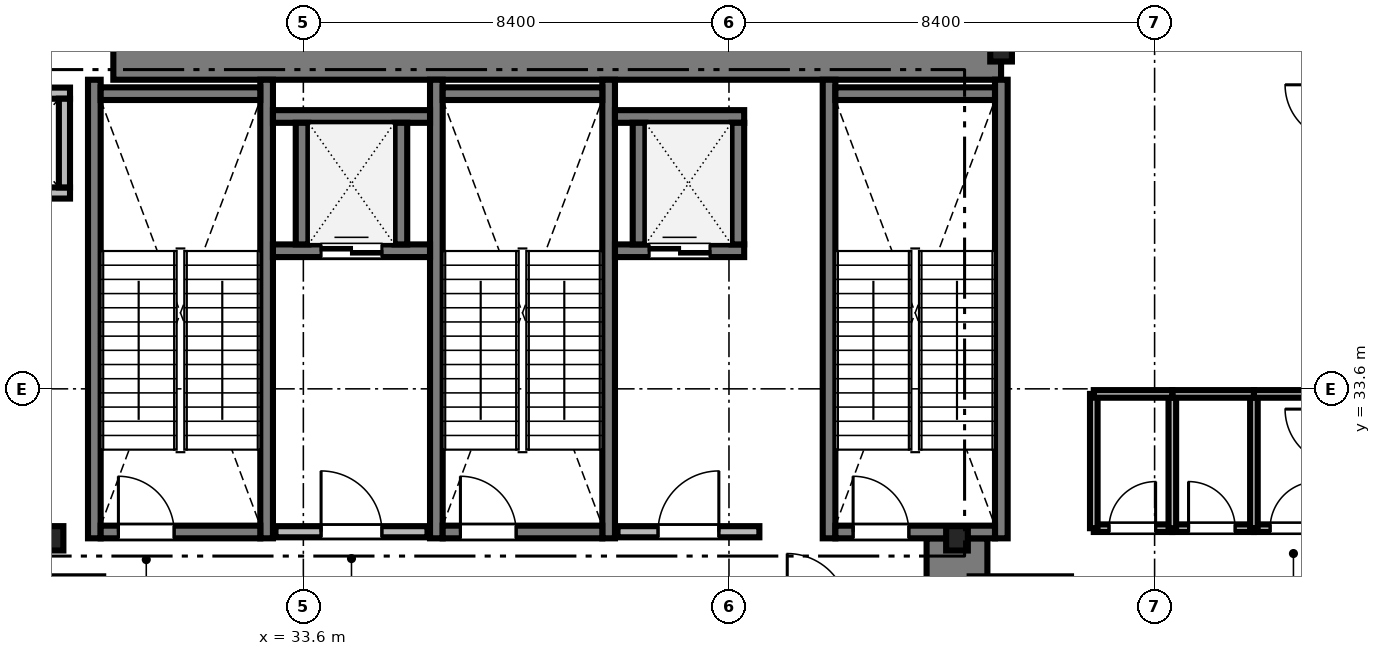
"""IFC4 building model, lengths in metres.
Left out: names, types, materials, properties, quantities, classifications, styles, units other than length and angle.
Written with IfcOpenShell. Run it as: python <this file> out.ifc"""

import sys

from ifc_helpers import new_model, si_unit, direction, frame, frame_2d, origin, origin_2d, place, context, subcontext, project, spatial, rectangle, i_section, extrude, source, transform, mapped, element, fill, save


model = new_model("IFC4")
c1 = context("Model", 3, precision=1e-05, world=origin(), true_north=direction((0.0, 1.0)))
c2 = subcontext(c1, "Body", "Model", "MODEL_VIEW")
j1 = project(units=[si_unit("LENGTHUNIT", "METRE"), si_unit("PLANEANGLEUNIT", "RADIAN")], contexts=[c1])
p1 = place(None, origin())
s1 = spatial("IfcSite", under=j1, at=p1, CompositionType="ELEMENT")
p2 = place(p1, origin())
s2 = spatial("IfcBuilding", under=s1, at=p2, CompositionType="ELEMENT")
p3 = place(p2, frame((0.0, 0.0, 6.0)))
s3 = spatial("IfcBuildingStorey", under=s2, at=p3, CompositionType="ELEMENT", Elevation=6.0)
m1 = source(origin(), c2, "Body", "SweptSolid", [
    extrude(rectangle(XDim=17.52, YDim=1.2, at=frame_2d((8.76, 0.0))), origin(), (0.0, 0.0, 1.0), 5.0),
])
p4 = place(p3, frame((29.85, 40.3, 0.0), z_axis=(0.0, 0.0, 1.0), x_axis=(1.0, 0.0, 0.0)))
e1 = element("IfcWall", 1, at=p4, inside=s3, PredefinedType="SHEAR", context=c2, shape_type="MappedRepresentation", body=[
    mapped(m1, transform((0.0, 0.0, 0.0), scale=1.0)),
])
m2 = source(origin(), c2, "Body", "SweptSolid", [
    extrude(rectangle(XDim=13.15, YDim=1.2, at=frame_2d((6.575, 0.0))), origin(), (0.0, 0.0, 1.0), 5.0),
])
p5 = place(p3, frame((46.5, 17.5, 0.0), z_axis=(0.0, 0.0, 1.0), x_axis=(0.0, 1.0, 0.0)))
e2 = element("IfcWall", 2, at=p5, inside=s3, PredefinedType="SHEAR", context=c2, shape_type="MappedRepresentation", body=[
    mapped(m2, transform((0.0, 0.0, 0.0), scale=1.0)),
])
m3 = source(origin(), c2, "Body", "SweptSolid", [
    extrude(i_section(OverallWidth=0.428, OverallDepth=0.481, WebThickness=0.04, FlangeThickness=0.063, FilletRadius=0.015, at=origin_2d()), origin(), (0.0, 0.0, 1.0), 5.0),
])
for number, where, z_axis, x_axis in (
    (3, (28.65, 30.65, 0.0), (0.0, 0.0, 1.0), (1.0, 0.0, 0.0)),
    (4, (46.5, 30.65, 0.0), (0.0, 0.0, 1.0), (1.0, 0.0, 0.0)),
    (5, (47.37, 40.3, 0.0), (0.0, 0.0, 1.0), (1.0, 0.0, 0.0)),
):
    element("IfcColumn", number, at=place(p3, frame(where, z_axis=z_axis, x_axis=x_axis)), inside=s3, PredefinedType="COLUMN", context=c2, shape_type="MappedRepresentation", body=[
        mapped(m3, transform((0.0, 0.0, 0.0), scale=1.0)),
    ])
m4 = source(origin(), c2, "Body", "SweptSolid", [
    extrude(rectangle(XDim=9.05, YDim=0.25, at=frame_2d((4.525, 0.0))), origin(), (0.0, 0.0, 1.0), 5.2),
])
for number, where, z_axis, x_axis in (
    (6, (29.475, 30.65, 0.0), (0.0, 0.0, 1.0), (0.0, 1.0, 0.0)),
    (7, (32.875, 30.65, 0.0), (0.0, 0.0, 1.0), (0.0, 1.0, 0.0)),
):
    element("IfcWall", number, at=place(p3, frame(where, z_axis=z_axis, x_axis=x_axis)), inside=s3, PredefinedType="SOLIDWALL", context=c2, shape_type="MappedRepresentation", body=[
        mapped(m4, transform((0.0, 0.0, 0.0), scale=1.0)),
    ])
m5 = source(origin(), c2, "Body", "SweptSolid", [
    extrude(rectangle(XDim=3.15, YDim=0.25, at=frame_2d((1.575, 0.0))), origin(), (0.0, 0.0, 1.0), 5.2),
])
p6 = place(p3, frame((29.6, 39.425, 0.0), z_axis=(0.0, 0.0, 1.0), x_axis=(1.0, 0.0, 0.0)))
e8 = element("IfcWall", 8, at=p6, inside=s3, PredefinedType="SOLIDWALL", context=c2, shape_type="MappedRepresentation", body=[
    mapped(m5, transform((0.0, 0.0, 0.0), scale=1.0)),
])
p7 = place(p3, frame((29.6, 30.775, 0.0), z_axis=(0.0, 0.0, 1.0), x_axis=(1.0, 0.0, 0.0)))
e9 = element("IfcWall", 9, at=p7, inside=s3, PredefinedType="SOLIDWALL", context=c2, shape_type="MappedRepresentation", body=[
    mapped(m5, transform((0.0, 0.0, 0.0), scale=1.0)),
])
m6 = source(origin(), c2, "Body", "SweptSolid", [
    extrude(rectangle(XDim=1.1, YDim=2.2, at=frame_2d((0.55, 1.1))), frame((0.0, 0.135, 0.0), z_axis=(0.0, -1.0, 0.0), x_axis=(1.0, 0.0, 0.0)), (0.0, 0.0, 1.0), 0.27),
])
p8 = place(p7, frame((0.35, 0.0, 0.0)))
e10 = element("IfcOpeningElement", 10, at=p8, cuts=e9, PredefinedType="OPENING", context=c2, shape_type="MappedRepresentation", body=[
    mapped(m6, transform((0.0, 0.0, 0.0), scale=1.0)),
])
for number, where, z_axis, x_axis in (
    (11, (36.225, 30.65, 0.0), (0.0, 0.0, 1.0), (0.0, 1.0, 0.0)),
    (12, (39.625, 30.65, 0.0), (0.0, 0.0, 1.0), (0.0, 1.0, 0.0)),
):
    element("IfcWall", number, at=place(p3, frame(where, z_axis=z_axis, x_axis=x_axis)), inside=s3, PredefinedType="SOLIDWALL", context=c2, shape_type="MappedRepresentation", body=[
        mapped(m4, transform((0.0, 0.0, 0.0), scale=1.0)),
    ])
p9 = place(p3, frame((36.35, 39.425, 0.0), z_axis=(0.0, 0.0, 1.0), x_axis=(1.0, 0.0, 0.0)))
e13 = element("IfcWall", 13, at=p9, inside=s3, PredefinedType="SOLIDWALL", context=c2, shape_type="MappedRepresentation", body=[
    mapped(m5, transform((0.0, 0.0, 0.0), scale=1.0)),
])
p10 = place(p3, frame((36.35, 30.775, 0.0), z_axis=(0.0, 0.0, 1.0), x_axis=(1.0, 0.0, 0.0)))
e14 = element("IfcWall", 14, at=p10, inside=s3, PredefinedType="SOLIDWALL", context=c2, shape_type="MappedRepresentation", body=[
    mapped(m5, transform((0.0, 0.0, 0.0), scale=1.0)),
])
p11 = place(p10, frame((0.35, 0.0, 0.0)))
e15 = element("IfcOpeningElement", 15, at=p11, cuts=e14, PredefinedType="OPENING", context=c2, shape_type="MappedRepresentation", body=[
    mapped(m6, transform((0.0, 0.0, 0.0), scale=1.0)),
])
for number, where, z_axis, x_axis in (
    (16, (43.975, 30.65, 0.0), (0.0, 0.0, 1.0), (0.0, 1.0, 0.0)),
    (17, (47.375, 30.65, 0.0), (0.0, 0.0, 1.0), (0.0, 1.0, 0.0)),
):
    element("IfcWall", number, at=place(p3, frame(where, z_axis=z_axis, x_axis=x_axis)), inside=s3, PredefinedType="SOLIDWALL", context=c2, shape_type="MappedRepresentation", body=[
        mapped(m4, transform((0.0, 0.0, 0.0), scale=1.0)),
    ])
p12 = place(p3, frame((44.1, 39.425, 0.0), z_axis=(0.0, 0.0, 1.0), x_axis=(1.0, 0.0, 0.0)))
e18 = element("IfcWall", 18, at=p12, inside=s3, PredefinedType="SOLIDWALL", context=c2, shape_type="MappedRepresentation", body=[
    mapped(m5, transform((0.0, 0.0, 0.0), scale=1.0)),
])
p13 = place(p3, frame((44.1, 30.775, 0.0), z_axis=(0.0, 0.0, 1.0), x_axis=(1.0, 0.0, 0.0)))
e19 = element("IfcWall", 19, at=p13, inside=s3, PredefinedType="SOLIDWALL", context=c2, shape_type="MappedRepresentation", body=[
    mapped(m5, transform((0.0, 0.0, 0.0), scale=1.0)),
])
p14 = place(p13, frame((0.35, 0.0, 0.0)))
e20 = element("IfcOpeningElement", 20, at=p14, cuts=e19, PredefinedType="OPENING", context=c2, shape_type="MappedRepresentation", body=[
    mapped(m6, transform((0.0, 0.0, 0.0), scale=1.0)),
])
m7 = source(origin(), c2, "Body", "SweptSolid", [
    extrude(rectangle(XDim=3.0, YDim=0.22, at=frame_2d((1.5, 0.0))), origin(), (0.0, 0.0, 1.0), 5.0),
])
p15 = place(p3, frame((33.05, 30.78, 0.0), z_axis=(0.0, 0.0, 1.0), x_axis=(1.0, 0.0, 0.0)))
e21 = element("IfcWall", 21, at=p15, inside=s3, PredefinedType="SOLIDWALL", context=c2, shape_type="MappedRepresentation", body=[
    mapped(m7, transform((0.0, 0.0, 0.0), scale=1.0)),
])
m8 = source(origin(), c2, "Body", "SweptSolid", [
    extrude(rectangle(XDim=1.2, YDim=2.2, at=frame_2d((0.6, 1.1))), frame((0.0, 0.12, 0.0), z_axis=(0.0, -1.0, 0.0), x_axis=(1.0, 0.0, 0.0)), (0.0, 0.0, 1.0), 0.24),
])
p16 = place(p15, frame((0.9, 0.0, 0.0)))
e22 = element("IfcOpeningElement", 22, at=p16, cuts=e21, PredefinedType="OPENING", context=c2, shape_type="MappedRepresentation", body=[
    mapped(m8, transform((0.0, 0.0, 0.0), scale=1.0)),
])
m9 = source(origin(), c2, "Body", "SweptSolid", [
    extrude(rectangle(XDim=2.8, YDim=0.22, at=frame_2d((1.4, 0.0))), origin(), (0.0, 0.0, 1.0), 5.0),
])
p17 = place(p3, frame((39.8, 30.78, 0.0), z_axis=(0.0, 0.0, 1.0), x_axis=(1.0, 0.0, 0.0)))
e23 = element("IfcWall", 23, at=p17, inside=s3, PredefinedType="SOLIDWALL", context=c2, shape_type="MappedRepresentation", body=[
    mapped(m9, transform((0.0, 0.0, 0.0), scale=1.0)),
])
p18 = place(p17, frame((0.8, 0.0, 0.0)))
e24 = element("IfcOpeningElement", 24, at=p18, cuts=e23, PredefinedType="OPENING", context=c2, shape_type="MappedRepresentation", body=[
    mapped(m8, transform((0.0, 0.0, 0.0), scale=1.0)),
])
m10 = source(origin(), c2, "Body", "SweptSolid", [
    extrude(rectangle(XDim=1.99, YDim=0.22, at=frame_2d((0.995, 0.0))), origin(), (0.0, 0.0, 1.0), 5.0),
])
for number, where, z_axis, x_axis in (
    (25, (27.005, 37.465, 0.0), (0.0, 0.0, 1.0), (1.0, 0.0, 0.0)),
    (26, (27.005, 39.435, 0.0), (0.0, 0.0, 1.0), (1.0, 0.0, 0.0)),
):
    element("IfcWall", number, at=place(p3, frame(where, z_axis=z_axis, x_axis=x_axis)), inside=s3, PredefinedType="SOLIDWALL", context=c2, shape_type="MappedRepresentation", body=[
        mapped(m10, transform((0.0, 0.0, 0.0), scale=1.0)),
    ])
m11 = source(origin(), c2, "Body", "SweptSolid", [
    extrude(rectangle(XDim=1.75, YDim=0.22, at=frame_2d((0.875, 0.0))), origin(), (0.0, 0.0, 1.0), 5.0),
])
p19 = place(p3, frame((28.885, 37.575, 0.0), z_axis=(0.0, 0.0, 1.0), x_axis=(0.0, 1.0, 0.0)))
e27 = element("IfcWall", 27, at=p19, inside=s3, PredefinedType="SOLIDWALL", context=c2, shape_type="MappedRepresentation", body=[
    mapped(m11, transform((0.0, 0.0, 0.0), scale=1.0)),
])
m12 = source(origin(), c2, "Body", "SweptSolid", [
    extrude(rectangle(XDim=3.1, YDim=0.25, at=frame_2d((1.55, 0.0))), origin(), (0.0, 0.0, 1.0), 5.0),
])
p20 = place(p3, frame((33.0, 36.325, 0.0), z_axis=(0.0, 0.0, 1.0), x_axis=(1.0, 0.0, 0.0)))
e28 = element("IfcWall", 28, at=p20, inside=s3, PredefinedType="SOLIDWALL", context=c2, shape_type="MappedRepresentation", body=[
    mapped(m12, transform((0.0, 0.0, 0.0), scale=1.0)),
])
m13 = source(origin(), c2, "Body", "SweptSolid", [
    extrude(rectangle(XDim=1.2, YDim=2.25, at=frame_2d((0.6, 1.125))), frame((0.0, 0.135, 0.0), z_axis=(0.0, -1.0, 0.0), x_axis=(1.0, 0.0, 0.0)), (0.0, 0.0, 1.0), 0.27),
])
p21 = place(p20, frame((0.95, 0.0, 0.0)))
e29 = element("IfcOpeningElement", 29, at=p21, cuts=e28, PredefinedType="OPENING", context=c2, shape_type="MappedRepresentation", body=[
    mapped(m13, transform((0.0, 0.0, 0.0), scale=1.0)),
])
p22 = place(p3, frame((33.0, 38.975, 0.0), z_axis=(0.0, 0.0, 1.0), x_axis=(1.0, 0.0, 0.0)))
e30 = element("IfcWall", 30, at=p22, inside=s3, PredefinedType="SOLIDWALL", context=c2, shape_type="MappedRepresentation", body=[
    mapped(m12, transform((0.0, 0.0, 0.0), scale=1.0)),
])
m14 = source(origin(), c2, "Body", "SweptSolid", [
    extrude(rectangle(XDim=2.4, YDim=0.25, at=frame_2d((1.2, 0.0))), origin(), (0.0, 0.0, 1.0), 5.0),
])
for number, where, z_axis, x_axis in (
    (31, (33.575, 36.45, 0.0), (0.0, 0.0, 1.0), (0.0, 1.0, 0.0)),
    (32, (35.525, 36.45, 0.0), (0.0, 0.0, 1.0), (0.0, 1.0, 0.0)),
):
    element("IfcWall", number, at=place(p3, frame(where, z_axis=z_axis, x_axis=x_axis)), inside=s3, PredefinedType="SOLIDWALL", context=c2, shape_type="MappedRepresentation", body=[
        mapped(m14, transform((0.0, 0.0, 0.0), scale=1.0)),
    ])
m15 = source(origin(), c2, "Body", "SweptSolid", [
    extrude(rectangle(XDim=2.55, YDim=0.25, at=frame_2d((1.275, 0.0))), origin(), (0.0, 0.0, 1.0), 5.0),
])
p23 = place(p3, frame((39.75, 36.325, 0.0), z_axis=(0.0, 0.0, 1.0), x_axis=(1.0, 0.0, 0.0)))
e33 = element("IfcWall", 33, at=p23, inside=s3, PredefinedType="SOLIDWALL", context=c2, shape_type="MappedRepresentation", body=[
    mapped(m15, transform((0.0, 0.0, 0.0), scale=1.0)),
])
p24 = place(p23, frame((0.675, 0.0, 0.0)))
e34 = element("IfcOpeningElement", 34, at=p24, cuts=e33, PredefinedType="OPENING", context=c2, shape_type="MappedRepresentation", body=[
    mapped(m13, transform((0.0, 0.0, 0.0), scale=1.0)),
])
p25 = place(p3, frame((39.75, 38.975, 0.0), z_axis=(0.0, 0.0, 1.0), x_axis=(1.0, 0.0, 0.0)))
e35 = element("IfcWall", 35, at=p25, inside=s3, PredefinedType="SOLIDWALL", context=c2, shape_type="MappedRepresentation", body=[
    mapped(m15, transform((0.0, 0.0, 0.0), scale=1.0)),
])
for number, where, z_axis, x_axis in (
    (36, (40.225, 36.45, 0.0), (0.0, 0.0, 1.0), (0.0, 1.0, 0.0)),
    (37, (42.175, 36.45, 0.0), (0.0, 0.0, 1.0), (0.0, 1.0, 0.0)),
):
    element("IfcWall", number, at=place(p3, frame(where, z_axis=z_axis, x_axis=x_axis)), inside=s3, PredefinedType="SOLIDWALL", context=c2, shape_type="MappedRepresentation", body=[
        mapped(m14, transform((0.0, 0.0, 0.0), scale=1.0)),
    ])
m16 = source(origin(), c2, "Body", "SweptSolid", [
    extrude(rectangle(XDim=1.588, YDim=0.15, at=frame_2d((0.794, 0.0))), origin(), (0.0, 0.0, 1.0), 5.0),
])
p26 = place(p3, frame((52.36, 30.85, 0.0), z_axis=(0.0, 0.0, 1.0), x_axis=(1.0, 0.0, 0.0)))
e38 = element("IfcWall", 38, at=p26, inside=s3, PredefinedType="PARTITIONING", context=c2, shape_type="MappedRepresentation", body=[
    mapped(m16, transform((0.0, 0.0, 0.0), scale=1.0)),
])
m17 = source(origin(), c2, "Body", "SweptSolid", [
    extrude(rectangle(XDim=0.92, YDim=2.1, at=frame_2d((0.46, 1.05))), frame((0.0, 0.085, 0.0), z_axis=(0.0, -1.0, 0.0), x_axis=(1.0, 0.0, 0.0)), (0.0, 0.0, 1.0), 0.17),
])
p27 = place(p26, frame((0.32, 0.0, 0.0)))
e39 = element("IfcOpeningElement", 39, at=p27, cuts=e38, PredefinedType="OPENING", context=c2, shape_type="MappedRepresentation", body=[
    mapped(m17, transform((0.0, 0.0, 0.0), scale=1.0)),
])
m18 = source(origin(), c2, "Body", "SweptSolid", [
    extrude(rectangle(XDim=1.61, YDim=0.15, at=frame_2d((0.805, 0.0))), origin(), (0.0, 0.0, 1.0), 5.0),
])
p28 = place(p3, frame((50.75, 30.85, 0.0), z_axis=(0.0, 0.0, 1.0), x_axis=(1.0, 0.0, 0.0)))
e40 = element("IfcWall", 40, at=p28, inside=s3, PredefinedType="PARTITIONING", context=c2, shape_type="MappedRepresentation", body=[
    mapped(m18, transform((0.0, 0.0, 0.0), scale=1.0)),
])
p29 = place(p28, frame((0.32, 0.0, 0.0)))
e41 = element("IfcOpeningElement", 41, at=p29, cuts=e40, PredefinedType="OPENING", context=c2, shape_type="MappedRepresentation", body=[
    mapped(m17, transform((0.0, 0.0, 0.0), scale=1.0)),
])
m19 = source(origin(), c2, "Body", "SweptSolid", [
    extrude(rectangle(XDim=1.55, YDim=0.15, at=frame_2d((0.775, 0.0))), origin(), (0.0, 0.0, 1.0), 5.0),
])
p30 = place(p3, frame((49.2, 30.85, 0.0), z_axis=(0.0, 0.0, 1.0), x_axis=(1.0, 0.0, 0.0)))
e42 = element("IfcWall", 42, at=p30, inside=s3, PredefinedType="PARTITIONING", context=c2, shape_type="MappedRepresentation", body=[
    mapped(m19, transform((0.0, 0.0, 0.0), scale=1.0)),
])
p31 = place(p30, frame((0.3, 0.0, 0.0)))
e43 = element("IfcOpeningElement", 43, at=p31, cuts=e42, PredefinedType="OPENING", context=c2, shape_type="MappedRepresentation", body=[
    mapped(m17, transform((0.0, 0.0, 0.0), scale=1.0)),
])
m20 = source(origin(), c2, "Body", "SweptSolid", [
    extrude(rectangle(XDim=2.65, YDim=0.15, at=frame_2d((1.325, 0.0))), origin(), (0.0, 0.0, 1.0), 5.0),
])
for number, where, z_axis, x_axis in (
    (44, (49.2, 30.85, 0.0), (0.0, 0.0, 1.0), (0.0, 1.0, 0.0)),
    (45, (50.75, 30.85, 0.0), (0.0, 0.0, 1.0), (0.0, 1.0, 0.0)),
    (46, (52.36, 30.85, 0.0), (0.0, 0.0, 1.0), (0.0, 1.0, 0.0)),
):
    element("IfcWall", number, at=place(p3, frame(where, z_axis=z_axis, x_axis=x_axis)), inside=s3, PredefinedType="PARTITIONING", context=c2, shape_type="MappedRepresentation", body=[
        mapped(m20, transform((0.0, 0.0, 0.0), scale=1.0)),
    ])
p32 = place(p3, frame((52.36, 33.5, 0.0), z_axis=(0.0, 0.0, 1.0), x_axis=(1.0, 0.0, 0.0)))
e47 = element("IfcWall", 47, at=p32, inside=s3, PredefinedType="PARTITIONING", context=c2, shape_type="MappedRepresentation", body=[
    mapped(m16, transform((0.0, 0.0, 0.0), scale=1.0)),
])
p33 = place(p3, frame((50.75, 33.5, 0.0), z_axis=(0.0, 0.0, 1.0), x_axis=(1.0, 0.0, 0.0)))
e48 = element("IfcWall", 48, at=p33, inside=s3, PredefinedType="PARTITIONING", context=c2, shape_type="MappedRepresentation", body=[
    mapped(m18, transform((0.0, 0.0, 0.0), scale=1.0)),
])
p34 = place(p3, frame((49.2, 33.5, 0.0), z_axis=(0.0, 0.0, 1.0), x_axis=(1.0, 0.0, 0.0)))
e49 = element("IfcWall", 49, at=p34, inside=s3, PredefinedType="PARTITIONING", context=c2, shape_type="MappedRepresentation", body=[
    mapped(m19, transform((0.0, 0.0, 0.0), scale=1.0)),
])
m21 = source(origin(), c2, "Body", "SweptSolid", [
    extrude(rectangle(XDim=1.1, YDim=2.2, at=frame_2d((0.55, 1.1))), frame((0.0, 0.025, 0.0), z_axis=(0.0, -1.0, 0.0), x_axis=(1.0, 0.0, 0.0)), (0.0, 0.0, 1.0), 0.05),
])
p35 = place(p8, origin())
e50 = element("IfcDoor", 50, at=p35, inside=s3, OperationType="SINGLE_SWING_LEFT", PredefinedType="DOOR", context=c2, shape_type="MappedRepresentation", body=[
    mapped(m21, transform((0.0, 0.0, 0.0), scale=1.0)),
])
fill(e10, e50)
p36 = place(p11, origin())
e51 = element("IfcDoor", 51, at=p36, inside=s3, OperationType="SINGLE_SWING_LEFT", PredefinedType="DOOR", context=c2, shape_type="MappedRepresentation", body=[
    mapped(m21, transform((0.0, 0.0, 0.0), scale=1.0)),
])
fill(e15, e51)
p37 = place(p14, origin())
e52 = element("IfcDoor", 52, at=p37, inside=s3, OperationType="SINGLE_SWING_LEFT", PredefinedType="DOOR", context=c2, shape_type="MappedRepresentation", body=[
    mapped(m21, transform((0.0, 0.0, 0.0), scale=1.0)),
])
fill(e20, e52)
m22 = source(origin(), c2, "Body", "SweptSolid", [
    extrude(rectangle(XDim=1.2, YDim=2.2, at=frame_2d((0.6, 1.1))), frame((0.0, 0.025, 0.0), z_axis=(0.0, -1.0, 0.0), x_axis=(1.0, 0.0, 0.0)), (0.0, 0.0, 1.0), 0.05),
])
p38 = place(p16, origin())
e53 = element("IfcDoor", 53, at=p38, inside=s3, OperationType="SINGLE_SWING_LEFT", PredefinedType="DOOR", context=c2, shape_type="MappedRepresentation", body=[
    mapped(m22, transform((0.0, 0.0, 0.0), scale=1.0)),
])
fill(e22, e53)
p39 = place(p18, origin())
e54 = element("IfcDoor", 54, at=p39, inside=s3, OperationType="SINGLE_SWING_RIGHT", PredefinedType="DOOR", context=c2, shape_type="MappedRepresentation", body=[
    mapped(m22, transform((0.0, 0.0, 0.0), scale=1.0)),
])
fill(e24, e54)
m23 = source(origin(), c2, "Body", "SweptSolid", [
    extrude(rectangle(XDim=1.2, YDim=2.25, at=frame_2d((0.6, 1.125))), frame((0.0, 0.025, 0.0), z_axis=(0.0, -1.0, 0.0), x_axis=(1.0, 0.0, 0.0)), (0.0, 0.0, 1.0), 0.05),
])
p40 = place(p21, origin())
e55 = element("IfcDoor", 55, at=p40, inside=s3, OperationType="DOUBLE_DOOR_SLIDING", PredefinedType="DOOR", context=c2, shape_type="MappedRepresentation", body=[
    mapped(m23, transform((0.0, 0.0, 0.0), scale=1.0)),
])
fill(e29, e55)
p41 = place(p24, origin())
e56 = element("IfcDoor", 56, at=p41, inside=s3, OperationType="DOUBLE_DOOR_SLIDING", PredefinedType="DOOR", context=c2, shape_type="MappedRepresentation", body=[
    mapped(m23, transform((0.0, 0.0, 0.0), scale=1.0)),
])
fill(e34, e56)
m24 = source(origin(), c2, "Body", "SweptSolid", [
    extrude(rectangle(XDim=0.92, YDim=2.1, at=frame_2d((0.46, 1.05))), frame((0.0, 0.025, 0.0), z_axis=(0.0, -1.0, 0.0), x_axis=(1.0, 0.0, 0.0)), (0.0, 0.0, 1.0), 0.05),
])
p42 = place(p27, origin())
e57 = element("IfcDoor", 57, at=p42, inside=s3, OperationType="SINGLE_SWING_RIGHT", PredefinedType="DOOR", context=c2, shape_type="MappedRepresentation", body=[
    mapped(m24, transform((0.0, 0.0, 0.0), scale=1.0)),
])
fill(e39, e57)
p43 = place(p29, origin())
e58 = element("IfcDoor", 58, at=p43, inside=s3, OperationType="SINGLE_SWING_LEFT", PredefinedType="DOOR", context=c2, shape_type="MappedRepresentation", body=[
    mapped(m24, transform((0.0, 0.0, 0.0), scale=1.0)),
])
fill(e41, e58)
p44 = place(p31, origin())
e59 = element("IfcDoor", 59, at=p44, inside=s3, OperationType="SINGLE_SWING_RIGHT", PredefinedType="DOOR", context=c2, shape_type="MappedRepresentation", body=[
    mapped(m24, transform((0.0, 0.0, 0.0), scale=1.0)),
])
fill(e43, e59)
save(model, sys.argv[1])
